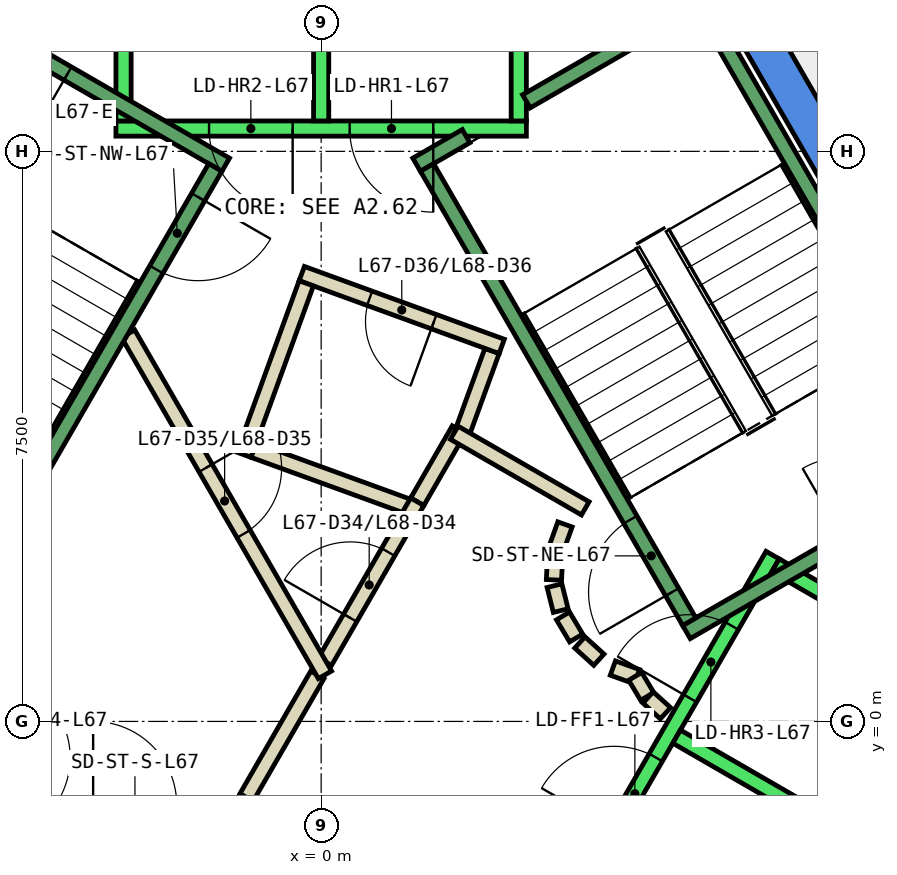
"""IFC4 building model, lengths in metres.
Left out: names, types, materials, properties, quantities, classifications, styles, units other than length and angle.
Written with IfcOpenShell. Run it as: python <this file> out.ifc"""

import sys

from ifc_helpers import new_model, si_unit, direction, frame, frame_2d, origin, place, context, subcontext, project, spatial, polyline, rectangle, outline, extrude, element, fill, save


model = new_model("IFC4")
c1 = context("Model", 3, precision=1e-05, world=origin(), true_north=direction((0.0, 1.0)))
c2 = subcontext(c1, "Body", "Model", "MODEL_VIEW")
j1 = project(units=[si_unit("LENGTHUNIT", "METRE"), si_unit("PLANEANGLEUNIT", "RADIAN")], contexts=[c1])
p1 = place(None, origin())
s1 = spatial("IfcSite", under=j1, at=p1, CompositionType="ELEMENT")
p2 = place(p1, origin())
s2 = spatial("IfcBuilding", under=s1, at=p2, CompositionType="ELEMENT")
p3 = place(p2, frame((0.0, 0.0, 290.0)))
s3 = spatial("IfcBuildingStorey", under=s2, at=p3, CompositionType="ELEMENT", Elevation=290.0)
p4 = place(p3, frame((0.0, 0.0, -0.34)))
e1 = element("IfcWall", 1, at=p4, inside=s3, PredefinedType="SHEAR", context=c2, shape_type="SweptSolid", body=[
    extrude(outline(polyline([(5.486, 9.998), (5.053, 9.748), (9.238, 2.5), (9.815, 2.5), (5.486, 9.998)])), origin(), (0.0, 0.0, 1.0), 3.6),
])
p5 = place(p3, frame((0.0, 0.0, -0.34)))
e2 = element("IfcWall", 2, at=p5, inside=s3, PredefinedType="SHEAR", context=c2, shape_type="SweptSolid", body=[
    extrude(outline(polyline([(4.907, -6.0), (9.815, 2.5), (9.238, 2.5), (4.619, -5.5), (4.907, -6.0)])), origin(), (0.0, 0.0, 1.0), 3.6),
])
p6 = place(p3, frame((1.264, 2.89, 0.0), z_axis=(0.0, 0.0, 1.0), x_axis=(0.500043792738, 0.866000118559, 0.0)))
e3 = element("IfcWall", 3, at=p6, inside=s3, PredefinedType="PARTITIONING", context=c2, shape_type="SweptSolid", body=[
    extrude(rectangle(XDim=1.096, YDim=0.2, at=frame_2d((0.548, 0.0))), origin(), (0.0, 0.0, 1.0), 3.26),
])
p7 = place(p3, frame((1.838, 3.748, 0.0), z_axis=(0.0, 0.0, 1.0), x_axis=(0.342266462435, 0.939602931398, 0.0)))
e4 = element("IfcWall", 4, at=p7, inside=s3, PredefinedType="PARTITIONING", context=c2, shape_type="SweptSolid", body=[
    extrude(rectangle(XDim=1.198, YDim=0.2, at=frame_2d((0.599, 0.0))), origin(), (0.0, 0.0, 1.0), 3.26),
])
p8 = place(p3, frame((2.376, 4.934, 0.0), z_axis=(0.0, 0.0, 1.0), x_axis=(-0.939640574808, 0.342163104635, 0.0)))
e5 = element("IfcWall", 5, at=p8, inside=s3, PredefinedType="PARTITIONING", context=c2, shape_type="SweptSolid", body=[
    extrude(rectangle(XDim=2.8, YDim=0.2, at=frame_2d((1.4, 0.0))), origin(), (0.0, 0.0, 1.0), 3.26),
])
p9 = place(p8, frame((0.95, 0.0, 0.0)))
e6 = element("IfcOpeningElement", 6, at=p9, cuts=e5, PredefinedType="OPENING", context=c2, shape_type="SweptSolid", body=[
    extrude(rectangle(XDim=0.9, YDim=2.1, at=frame_2d((0.45, 1.05))), frame((0.0, 0.11, 0.0), z_axis=(0.0, -1.0, 0.0), x_axis=(1.0, 0.0, 0.0)), (0.0, 0.0, 1.0), 0.22),
])
p10 = place(p3, frame((-0.196, 5.764, 0.0), z_axis=(0.0, 0.0, 1.0), x_axis=(-0.34165322761, -0.939826086073, 0.0)))
e7 = element("IfcWall", 7, at=p10, inside=s3, PredefinedType="PARTITIONING", context=c2, shape_type="SweptSolid", body=[
    extrude(rectangle(XDim=2.4, YDim=0.2, at=frame_2d((1.2, 0.0))), origin(), (0.0, 0.0, 1.0), 3.26),
])
p11 = place(p3, frame((-0.888, 3.568, 0.0), z_axis=(0.0, 0.0, 1.0), x_axis=(0.939685034098, -0.34204098686, 0.0)))
e8 = element("IfcWall", 8, at=p11, inside=s3, PredefinedType="PARTITIONING", context=c2, shape_type="SweptSolid", body=[
    extrude(rectangle(XDim=2.237, YDim=0.2, at=frame_2d((1.119, 0.0))), origin(), (0.0, 0.0, 1.0), 3.26),
])
p12 = place(p3, frame((-0.982, -1.0, 0.0), z_axis=(0.0, 0.0, 1.0), x_axis=(0.50024047865, 0.865886518847, 0.0)))
e9 = element("IfcWall", 9, at=p12, inside=s3, PredefinedType="PARTITIONING", context=c2, shape_type="SweptSolid", body=[
    extrude(rectangle(XDim=1.863, YDim=0.2, at=frame_2d((0.931, 0.0))), origin(), (0.0, 0.0, 1.0), 3.26),
])
p13 = place(p3, frame((0.05, 0.787, 0.0), z_axis=(0.0, 0.0, 1.0), x_axis=(0.499945861543, 0.866056658381, 0.0)))
e10 = element("IfcWall", 10, at=p13, inside=s3, PredefinedType="PARTITIONING", context=c2, shape_type="SweptSolid", body=[
    extrude(rectangle(XDim=2.428, YDim=0.2, at=frame_2d((1.214, 0.0))), origin(), (0.0, 0.0, 1.0), 3.26),
])
p14 = place(p13, frame((0.664, 0.0, 0.0)))
e11 = element("IfcOpeningElement", 11, at=p14, cuts=e10, PredefinedType="OPENING", context=c2, shape_type="SweptSolid", body=[
    extrude(rectangle(XDim=1.0, YDim=2.1, at=frame_2d((0.5, 1.05))), frame((0.0, 0.11, 0.0), z_axis=(0.0, -1.0, 0.0), x_axis=(1.0, 0.0, 0.0)), (0.0, 0.0, 1.0), 0.22),
])
p15 = place(p3, frame((1.751, 3.798, 0.0), z_axis=(0.0, 0.0, 1.0), x_axis=(0.866091650241, -0.499885240213, 0.0)))
e12 = element("IfcWall", 12, at=p15, inside=s3, PredefinedType="PARTITIONING", context=c2, shape_type="SweptSolid", body=[
    extrude(rectangle(XDim=1.991, YDim=0.2, at=frame_2d((0.995, 0.0))), origin(), (0.0, 0.0, 1.0), 3.26),
])
p16 = place(p3, frame((3.208, 2.592, 0.0), z_axis=(0.0, 0.0, 1.0), x_axis=(-0.337388820924, -0.941365382578, 0.0)))
e13 = element("IfcWall", 13, at=p16, inside=s3, PredefinedType="PARTITIONING", context=c2, shape_type="SweptSolid", body=[
    extrude(rectangle(XDim=0.338, YDim=0.2, at=frame_2d((0.169, 0.0))), origin(), (0.0, 0.0, 1.0), 3.26),
])
p17 = place(p3, frame((3.079, 2.199, 0.0), z_axis=(0.0, 0.0, 1.0), x_axis=(-0.047771483479, -0.998858290933, 0.0)))
e14 = element("IfcWall", 14, at=p17, inside=s3, PredefinedType="PARTITIONING", context=c2, shape_type="SweptSolid", body=[
    extrude(rectangle(XDim=0.337, YDim=0.2, at=frame_2d((0.169, 0.0))), origin(), (0.0, 0.0, 1.0), 3.26),
])
p18 = place(p3, frame((3.07, 1.786, 0.0), z_axis=(0.0, 0.0, 1.0), x_axis=(0.242705583207, -0.970099994784, 0.0)))
e15 = element("IfcWall", 15, at=p18, inside=s3, PredefinedType="PARTITIONING", context=c2, shape_type="SweptSolid", body=[
    extrude(rectangle(XDim=0.338, YDim=0.2, at=frame_2d((0.169, 0.0))), origin(), (0.0, 0.0, 1.0), 3.26),
])
for number, where, z_axis, x_axis in (
    (16, (3.182, 1.388, 0.0), (0.0, 0.0, 1.0), (0.512, -0.859, 0.0)),
    (17, (3.404, 1.039, 0.0), (0.0, 0.0, 1.0), (0.74, -0.672, 0.0)),
):
    element("IfcWall", number, at=place(p3, frame(where, z_axis=z_axis, x_axis=x_axis)), inside=s3, PredefinedType="PARTITIONING", context=c2, shape_type="SweptSolid", body=[
        extrude(rectangle(XDim=0.338, YDim=0.2, at=frame_2d((0.169, 0.0))), origin(), (0.0, 0.0, 1.0), 3.26),
    ])
p19 = place(p3, frame((3.838, 0.702, 0.0), z_axis=(0.0, 0.0, 1.0), x_axis=(0.941035081519, -0.338308993895, 0.0)))
e18 = element("IfcWall", 18, at=p19, inside=s3, PredefinedType="PARTITIONING", context=c2, shape_type="SweptSolid", body=[
    extrude(rectangle(XDim=0.337, YDim=0.2, at=frame_2d((0.168, 0.0))), origin(), (0.0, 0.0, 1.0), 3.26),
])
p20 = place(p3, frame((4.132, 0.593, 0.0), z_axis=(0.0, 0.0, 1.0), x_axis=(0.513561617048, -0.858052717201, 0.0)))
e19 = element("IfcWall", 19, at=p20, inside=s3, PredefinedType="PARTITIONING", context=c2, shape_type="SweptSolid", body=[
    extrude(rectangle(XDim=0.308, YDim=0.2, at=frame_2d((0.154, 0.0))), origin(), (0.0, 0.0, 1.0), 3.26),
])
p21 = place(p3, frame((4.301, 0.315, 0.0), z_axis=(0.0, 0.0, 1.0), x_axis=(0.741798017506, -0.670623367639, 0.0)))
e20 = element("IfcWall", 20, at=p21, inside=s3, PredefinedType="PARTITIONING", context=c2, shape_type="SweptSolid", body=[
    extrude(rectangle(XDim=0.309, YDim=0.2, at=frame_2d((0.154, 0.0))), origin(), (0.0, 0.0, 1.0), 3.26),
])
p22 = place(p3, frame((-2.54, 5.1, 0.0), z_axis=(0.0, 0.0, 1.0), x_axis=(0.499925051871, -0.866068670783, 0.0)))
e21 = element("IfcWall", 21, at=p22, inside=s3, PredefinedType="PARTITIONING", context=c2, shape_type="SweptSolid", body=[
    extrude(rectangle(XDim=5.181, YDim=0.2, at=frame_2d((2.59, 0.0))), origin(), (0.0, 0.0, 1.0), 3.26),
])
p23 = place(p22, frame((2.04, 0.0, 0.0)))
e22 = element("IfcOpeningElement", 22, at=p23, cuts=e21, PredefinedType="OPENING", context=c2, shape_type="SweptSolid", body=[
    extrude(rectangle(XDim=1.0, YDim=2.1, at=frame_2d((0.5, 1.05))), frame((0.0, 0.11, 0.0), z_axis=(0.0, -1.0, 0.0), x_axis=(1.0, 0.0, 0.0)), (0.0, 0.0, 1.0), 0.22),
])
p24 = place(p3, frame((2.7, 7.8, 0.0), z_axis=(0.0, 0.0, 1.0), x_axis=(-1.0, 0.0, 0.0)))
e23 = element("IfcWall", 23, at=p24, inside=s3, PredefinedType="STANDARD", context=c2, shape_type="SweptSolid", body=[
    extrude(rectangle(XDim=5.4, YDim=0.2, at=frame_2d((2.7, 0.0))), origin(), (0.0, 0.0, 1.0), 3.26),
])
p25 = place(p24, frame((1.225, 0.0, 0.0)))
e24 = element("IfcOpeningElement", 24, at=p25, cuts=e23, PredefinedType="OPENING", context=c2, shape_type="SweptSolid", body=[
    extrude(rectangle(XDim=1.1, YDim=2.1, at=frame_2d((0.55, 1.05))), frame((0.0, 0.11, 0.0), z_axis=(0.0, -1.0, 0.0), x_axis=(1.0, 0.0, 0.0)), (0.0, 0.0, 1.0), 0.22),
])
p26 = place(p24, frame((3.075, 0.0, 0.0)))
e25 = element("IfcOpeningElement", 25, at=p26, cuts=e23, PredefinedType="OPENING", context=c2, shape_type="SweptSolid", body=[
    extrude(rectangle(XDim=1.1, YDim=2.1, at=frame_2d((0.55, 1.05))), frame((0.0, 0.11, 0.0), z_axis=(0.0, -1.0, 0.0), x_axis=(1.0, 0.0, 0.0)), (0.0, 0.0, 1.0), 0.22),
])
for number, where, z_axis, x_axis in (
    (26, (2.6, 7.9, 0.0), (0.0, 0.0, 1.0), (0.0, 1.0, 0.0)),
    (27, (0.0, 7.9, 0.0), (0.0, 0.0, 1.0), (0.0, 1.0, 0.0)),
    (28, (-2.6, 7.9, 0.0), (0.0, 0.0, 1.0), (0.0, 1.0, 0.0)),
):
    element("IfcWall", number, at=place(p3, frame(where, z_axis=z_axis, x_axis=x_axis)), inside=s3, PredefinedType="STANDARD", context=c2, shape_type="SweptSolid", body=[
        extrude(rectangle(XDim=2.4, YDim=0.2, at=frame_2d((1.2, 0.0))), origin(), (0.0, 0.0, 1.0), 3.26),
    ])
p27 = place(p3, frame((-5.94, 2.188, 0.0), z_axis=(0.0, 0.0, 1.0), x_axis=(0.500034260056, -0.866005622828, 0.0)))
e29 = element("IfcWall", 29, at=p27, inside=s3, PredefinedType="STANDARD", context=c2, shape_type="SweptSolid", body=[
    extrude(rectangle(XDim=5.399, YDim=0.2, at=frame_2d((2.7, 0.0))), origin(), (0.0, 0.0, 1.0), 3.26),
])
p28 = place(p27, frame((3.075, 0.0, 0.0)))
e30 = element("IfcOpeningElement", 30, at=p28, cuts=e29, PredefinedType="OPENING", context=c2, shape_type="SweptSolid", body=[
    extrude(rectangle(XDim=1.1, YDim=2.1, at=frame_2d((0.55, 1.05))), frame((0.0, 0.11, 0.0), z_axis=(0.0, -1.0, 0.0), x_axis=(1.0, 0.0, 0.0)), (0.0, 0.0, 1.0), 0.22),
])
p29 = place(p27, frame((1.225, 0.0, 0.0)))
e31 = element("IfcOpeningElement", 31, at=p29, cuts=e29, PredefinedType="OPENING", context=c2, shape_type="SweptSolid", body=[
    extrude(rectangle(XDim=1.1, YDim=2.1, at=frame_2d((0.55, 1.05))), frame((0.0, 0.11, 0.0), z_axis=(0.0, -1.0, 0.0), x_axis=(1.0, 0.0, 0.0)), (0.0, 0.0, 1.0), 0.22),
])
p30 = place(p3, frame((3.24, -2.488, 0.0), z_axis=(0.0, 0.0, 1.0), x_axis=(0.500034260056, 0.866005622828, 0.0)))
e32 = element("IfcWall", 32, at=p30, inside=s3, PredefinedType="STANDARD", context=c2, shape_type="SweptSolid", body=[
    extrude(rectangle(XDim=5.399, YDim=0.2, at=frame_2d((2.7, 0.0))), origin(), (0.0, 0.0, 1.0), 3.26),
])
p31 = place(p30, frame((3.225, 0.0, 0.0)))
e33 = element("IfcOpeningElement", 33, at=p31, cuts=e32, PredefinedType="OPENING", context=c2, shape_type="SweptSolid", body=[
    extrude(rectangle(XDim=1.1, YDim=2.1, at=frame_2d((0.55, 1.05))), frame((0.0, 0.11, 0.0), z_axis=(0.0, -1.0, 0.0), x_axis=(1.0, 0.0, 0.0)), (0.0, 0.0, 1.0), 0.22),
])
p32 = place(p30, frame((1.225, 0.0, 0.0)))
e34 = element("IfcOpeningElement", 34, at=p32, cuts=e32, PredefinedType="OPENING", context=c2, shape_type="SweptSolid", body=[
    extrude(rectangle(XDim=1.1, YDim=2.1, at=frame_2d((0.55, 1.05))), frame((0.0, 0.11, 0.0), z_axis=(0.0, -1.0, 0.0), x_axis=(1.0, 0.0, 0.0)), (0.0, 0.0, 1.0), 0.22),
])
p33 = place(p3, frame((5.492, -3.788, 0.0), z_axis=(0.0, 0.0, 1.0), x_axis=(0.500034260056, 0.866005622828, 0.0)))
e35 = element("IfcWall", 35, at=p33, inside=s3, PredefinedType="STANDARD", context=c2, shape_type="SweptSolid", body=[
    extrude(rectangle(XDim=5.399, YDim=0.2, at=frame_2d((2.7, 0.0))), origin(), (0.0, 0.0, 1.0), 3.26),
])
for number, where, z_axis, x_axis in (
    (36, (4.677, -0.2, 0.0), (0.0, 0.0, 1.0), (0.866, -0.5, 0.0)),
    (37, (5.977, 2.052, 0.0), (0.0, 0.0, 1.0), (0.866, -0.5, 0.0)),
):
    element("IfcWall", number, at=place(p3, frame(where, z_axis=z_axis, x_axis=x_axis)), inside=s3, PredefinedType="STANDARD", context=c2, shape_type="SweptSolid", body=[
        extrude(rectangle(XDim=2.399, YDim=0.2, at=frame_2d((1.2, 0.0))), origin(), (0.0, 0.0, 1.0), 3.26),
    ])
p34 = place(p3, frame((4.806, 1.176, 0.0), z_axis=(0.0, 0.0, 1.0), x_axis=(0.866059941101, 0.499940174841, 0.0)))
e38 = element("IfcWall", 38, at=p34, inside=s3, PredefinedType="STANDARD", context=c2, shape_type="SweptSolid", body=[
    extrude(rectangle(XDim=4.4, YDim=0.2, at=frame_2d((2.2, 0.0))), origin(), (0.0, 0.0, 1.0), 3.26),
])
p35 = place(p34, frame((2.4, 0.0, 0.0)))
e39 = element("IfcOpeningElement", 39, at=p35, cuts=e38, PredefinedType="OPENING", context=c2, shape_type="SweptSolid", body=[
    extrude(rectangle(XDim=1.1, YDim=2.2, at=frame_2d((0.55, 1.1))), frame((0.0, 0.11, 0.0), z_axis=(0.0, -1.0, 0.0), x_axis=(1.0, 0.0, 0.0)), (0.0, 0.0, 1.0), 0.22),
])
p36 = place(p3, frame((2.7, 8.158, 0.0), z_axis=(0.0, 0.0, 1.0), x_axis=(0.86611865017, 0.499838457731, 0.0)))
e40 = element("IfcWall", 40, at=p36, inside=s3, PredefinedType="STANDARD", context=c2, shape_type="SweptSolid", body=[
    extrude(rectangle(XDim=2.733, YDim=0.2, at=frame_2d((1.366, 0.0))), origin(), (0.0, 0.0, 1.0), 3.26),
])
p37 = place(p3, frame((1.256, 7.324, 0.0), z_axis=(0.0, 0.0, 1.0), x_axis=(0.865915093549, 0.500191014278, 0.0)))
e41 = element("IfcWall", 41, at=p37, inside=s3, PredefinedType="STANDARD", context=c2, shape_type="SweptSolid", body=[
    extrude(rectangle(XDim=0.752, YDim=0.2, at=frame_2d((0.376, 0.0))), origin(), (0.0, 0.0, 1.0), 3.26),
])
p38 = place(p3, frame((4.843, 1.312, 0.0), z_axis=(0.0, 0.0, 1.0), x_axis=(-0.499963383562, 0.866046543262, 0.0)))
e42 = element("IfcWall", 42, at=p38, inside=s3, PredefinedType="STANDARD", context=c2, shape_type="SweptSolid", body=[
    extrude(rectangle(XDim=6.9, YDim=0.2, at=frame_2d((3.45, 0.0))), origin(), (0.0, 0.0, 1.0), 3.26),
])
p39 = place(p38, frame((0.45, 0.0, 0.0)))
e43 = element("IfcOpeningElement", 43, at=p39, cuts=e42, PredefinedType="OPENING", context=c2, shape_type="SweptSolid", body=[
    extrude(rectangle(XDim=1.1, YDim=2.2, at=frame_2d((0.55, 1.1))), frame((0.0, 0.11, 0.0), z_axis=(0.0, -1.0, 0.0), x_axis=(1.0, 0.0, 0.0)), (0.0, 0.0, 1.0), 0.22),
])
p40 = place(p3, frame((8.48, 3.412, 0.0), z_axis=(0.0, 0.0, 1.0), x_axis=(-0.499978703459, 0.866037698999, 0.0)))
e44 = element("IfcWall", 44, at=p40, inside=s3, PredefinedType="STANDARD", context=c2, shape_type="SweptSolid", body=[
    extrude(rectangle(XDim=6.9, YDim=0.2, at=frame_2d((3.45, 0.0))), origin(), (0.0, 0.0, 1.0), 3.26),
])
p41 = place(p3, frame((-1.256, 7.324, 0.0), z_axis=(0.0, 0.0, 1.0), x_axis=(-0.866046073146, 0.499964197906, 0.0)))
e45 = element("IfcWall", 45, at=p41, inside=s3, PredefinedType="STANDARD", context=c2, shape_type="SweptSolid", body=[
    extrude(rectangle(XDim=4.4, YDim=0.2, at=frame_2d((2.2, 0.0))), origin(), (0.0, 0.0, 1.0), 3.26),
])
p42 = place(p41, frame((2.4, 0.0, 0.0)))
e46 = element("IfcOpeningElement", 46, at=p42, cuts=e45, PredefinedType="OPENING", context=c2, shape_type="SweptSolid", body=[
    extrude(rectangle(XDim=1.1, YDim=2.2, at=frame_2d((0.55, 1.1))), frame((0.0, 0.11, 0.0), z_axis=(0.0, -1.0, 0.0), x_axis=(1.0, 0.0, 0.0)), (0.0, 0.0, 1.0), 0.22),
])
p43 = place(p3, frame((-1.393, 7.288, 0.0), z_axis=(0.0, 0.0, 1.0), x_axis=(-0.499963383562, -0.866046543262, 0.0)))
e47 = element("IfcWall", 47, at=p43, inside=s3, PredefinedType="STANDARD", context=c2, shape_type="SweptSolid", body=[
    extrude(rectangle(XDim=6.9, YDim=0.2, at=frame_2d((3.45, 0.0))), origin(), (0.0, 0.0, 1.0), 3.26),
])
p44 = place(p43, frame((0.45, 0.0, 0.0)))
e48 = element("IfcOpeningElement", 48, at=p44, cuts=e47, PredefinedType="OPENING", context=c2, shape_type="SweptSolid", body=[
    extrude(rectangle(XDim=1.1, YDim=2.2, at=frame_2d((0.55, 1.1))), frame((0.0, 0.11, 0.0), z_axis=(0.0, -1.0, 0.0), x_axis=(1.0, 0.0, 0.0)), (0.0, 0.0, 1.0), 0.22),
])
p45 = place(p14, origin())
e49 = element("IfcDoor", 49, at=p45, inside=s3, OperationType="SINGLE_SWING_RIGHT", PredefinedType="DOOR", context=c2, shape_type="SweptSolid", body=[
    extrude(rectangle(XDim=1.0, YDim=2.1, at=frame_2d((0.5, 1.05))), frame((0.0, 0.025, 0.0), z_axis=(0.0, -1.0, 0.0), x_axis=(1.0, 0.0, 0.0)), (0.0, 0.0, 1.0), 0.05),
])
fill(e11, e49)
p46 = place(p23, origin())
e50 = element("IfcDoor", 50, at=p46, inside=s3, OperationType="SINGLE_SWING_RIGHT", PredefinedType="DOOR", context=c2, shape_type="SweptSolid", body=[
    extrude(rectangle(XDim=1.0, YDim=2.1, at=frame_2d((0.5, 1.05))), frame((0.0, 0.025, 0.0), z_axis=(0.0, -1.0, 0.0), x_axis=(1.0, 0.0, 0.0)), (0.0, 0.0, 1.0), 0.05),
])
fill(e22, e50)
p47 = place(p9, origin())
e51 = element("IfcDoor", 51, at=p47, inside=s3, OperationType="SINGLE_SWING_LEFT", PredefinedType="DOOR", context=c2, shape_type="SweptSolid", body=[
    extrude(rectangle(XDim=0.9, YDim=2.1, at=frame_2d((0.45, 1.05))), frame((0.0, 0.025, 0.0), z_axis=(0.0, -1.0, 0.0), x_axis=(1.0, 0.0, 0.0)), (0.0, 0.0, 1.0), 0.05),
])
fill(e6, e51)
p48 = place(p25, origin())
e52 = element("IfcDoor", 52, at=p48, inside=s3, OperationType="SLIDING_TO_LEFT", PredefinedType="DOOR", context=c2, shape_type="SweptSolid", body=[
    extrude(rectangle(XDim=1.1, YDim=2.1, at=frame_2d((0.55, 1.05))), frame((0.0, 0.025, 0.0), z_axis=(0.0, -1.0, 0.0), x_axis=(1.0, 0.0, 0.0)), (0.0, 0.0, 1.0), 0.05),
])
fill(e24, e52)
p49 = place(p26, origin())
e53 = element("IfcDoor", 53, at=p49, inside=s3, OperationType="SLIDING_TO_LEFT", PredefinedType="DOOR", context=c2, shape_type="SweptSolid", body=[
    extrude(rectangle(XDim=1.1, YDim=2.1, at=frame_2d((0.55, 1.05))), frame((0.0, 0.025, 0.0), z_axis=(0.0, -1.0, 0.0), x_axis=(1.0, 0.0, 0.0)), (0.0, 0.0, 1.0), 0.05),
])
fill(e25, e53)
p50 = place(p31, origin())
e54 = element("IfcDoor", 54, at=p50, inside=s3, OperationType="SLIDING_TO_LEFT", PredefinedType="DOOR", context=c2, shape_type="SweptSolid", body=[
    extrude(rectangle(XDim=1.1, YDim=2.1, at=frame_2d((0.55, 1.05))), frame((0.0, 0.025, 0.0), z_axis=(0.0, -1.0, 0.0), x_axis=(1.0, 0.0, 0.0)), (0.0, 0.0, 1.0), 0.05),
])
fill(e33, e54)
p51 = place(p32, origin())
e55 = element("IfcDoor", 55, at=p51, inside=s3, OperationType="SLIDING_TO_LEFT", PredefinedType="DOOR", context=c2, shape_type="SweptSolid", body=[
    extrude(rectangle(XDim=1.1, YDim=2.1, at=frame_2d((0.55, 1.05))), frame((0.0, 0.025, 0.0), z_axis=(0.0, -1.0, 0.0), x_axis=(1.0, 0.0, 0.0)), (0.0, 0.0, 1.0), 0.05),
])
fill(e34, e55)
p52 = place(p39, origin())
e56 = element("IfcDoor", 56, at=p52, inside=s3, OperationType="SINGLE_SWING_LEFT", PredefinedType="DOOR", context=c2, shape_type="SweptSolid", body=[
    extrude(rectangle(XDim=1.1, YDim=2.2, at=frame_2d((0.55, 1.1))), frame((0.0, 0.025, 0.0), z_axis=(0.0, -1.0, 0.0), x_axis=(1.0, 0.0, 0.0)), (0.0, 0.0, 1.0), 0.05),
])
fill(e43, e56)
p53 = place(p44, origin())
e57 = element("IfcDoor", 57, at=p53, inside=s3, OperationType="SINGLE_SWING_LEFT", PredefinedType="DOOR", context=c2, shape_type="SweptSolid", body=[
    extrude(rectangle(XDim=1.1, YDim=2.2, at=frame_2d((0.55, 1.1))), frame((0.0, 0.025, 0.0), z_axis=(0.0, -1.0, 0.0), x_axis=(1.0, 0.0, 0.0)), (0.0, 0.0, 1.0), 0.05),
])
fill(e48, e57)
p54 = place(p42, origin())
e58 = element("IfcDoor", 58, at=p54, inside=s3, OperationType="SINGLE_SWING_LEFT", PredefinedType="DOOR", context=c2, shape_type="SweptSolid", body=[
    extrude(rectangle(XDim=1.1, YDim=2.2, at=frame_2d((0.55, 1.1))), frame((0.0, 0.025, 0.0), z_axis=(0.0, -1.0, 0.0), x_axis=(1.0, 0.0, 0.0)), (0.0, 0.0, 1.0), 0.05),
])
fill(e46, e58)
save(model, sys.argv[1])
